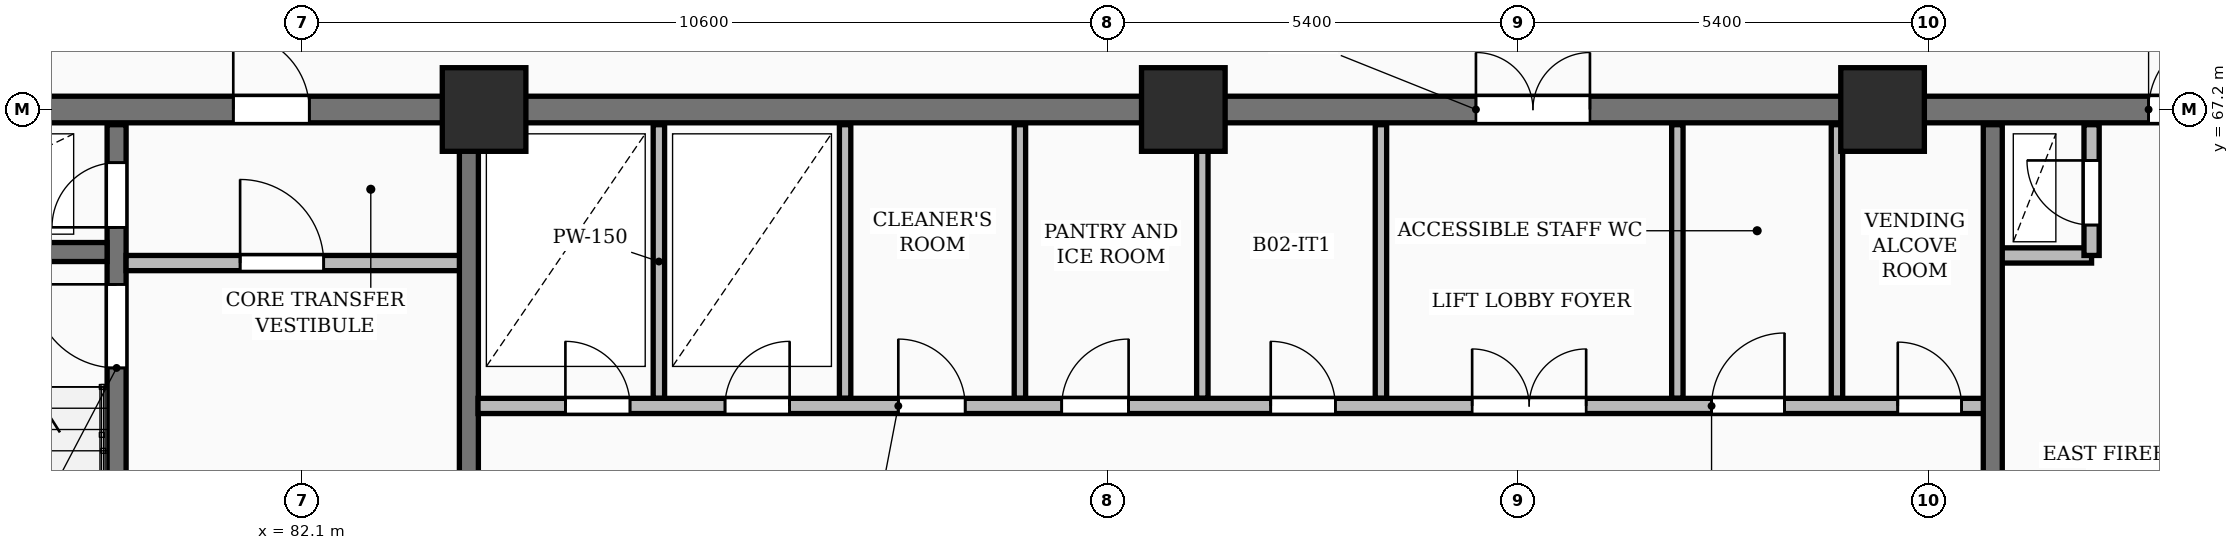
"""IFC4 building model, lengths in metres.
Left out: names, types, materials, properties, quantities, classifications, styles, units other than length and angle.
Written with IfcOpenShell. Run it as: python <this file> out.ifc"""

import sys

from ifc_helpers import new_model, si_unit, direction, frame, frame_2d, origin, origin_2d, place, context, subcontext, project, spatial, rectangle, extrude, element, fill, save


model = new_model("IFC4")
c1 = context("Model", 3, precision=1e-05, world=origin(), true_north=direction((0.0, 1.0)))
c2 = subcontext(c1, "Body", "Model", "MODEL_VIEW")
j1 = project(units=[si_unit("LENGTHUNIT", "METRE"), si_unit("PLANEANGLEUNIT", "RADIAN")], contexts=[c1])
p1 = place(None, origin())
s1 = spatial("IfcSite", under=j1, at=p1, CompositionType="ELEMENT")
p2 = place(p1, origin())
s2 = spatial("IfcBuilding", under=s1, at=p2, CompositionType="ELEMENT")
p3 = place(p2, frame((0.0, 0.0, -7.2)))
s3 = spatial("IfcBuildingStorey", under=s2, at=p3, CompositionType="ELEMENT", Elevation=-7.2)
for number, where, z_axis, x_axis in (
    (1, (84.5, 67.2, 0.0), (0.0, 0.0, 1.0), (1.0, 0.0, 0.0)),
    (2, (93.7, 67.2, 0.0), (0.0, 0.0, 1.0), (1.0, 0.0, 0.0)),
    (3, (102.9, 67.2, 0.0), (0.0, 0.0, 1.0), (1.0, 0.0, 0.0)),
):
    element("IfcColumn", number, at=place(p3, frame(where, z_axis=z_axis, x_axis=x_axis)), inside=s3, PredefinedType="COLUMN", context=c2, shape_type="SweptSolid", body=[
        extrude(rectangle(XDim=1.1, YDim=1.1, at=origin_2d()), origin(), (0.0, 0.0, 1.0), 3.6),
    ])
p4 = place(p3, frame((75.95, 67.2, 0.0), z_axis=(0.0, 0.0, 1.0), x_axis=(1.0, 0.0, 0.0)))
e4 = element("IfcWall", 4, at=p4, inside=s3, PredefinedType="SHEAR", context=c2, shape_type="SweptSolid", body=[
    extrude(rectangle(XDim=36.3, YDim=0.35, at=frame_2d((18.15, 0.0))), origin(), (0.0, 0.0, 1.0), 3.6),
])
p5 = place(p4, frame((5.25, 0.0, 0.0)))
e5 = element("IfcOpeningElement", 5, at=p5, cuts=e4, PredefinedType="OPENING", context=c2, shape_type="SweptSolid", body=[
    extrude(rectangle(XDim=1.0, YDim=2.15, at=frame_2d((0.5, 1.075))), frame((0.0, 0.185, 0.0), z_axis=(0.0, -1.0, 0.0), x_axis=(1.0, 0.0, 0.0)), (0.0, 0.0, 1.0), 0.37),
])
p6 = place(p4, frame((21.6, 0.0, 0.0)))
e6 = element("IfcOpeningElement", 6, at=p6, cuts=e4, PredefinedType="OPENING", context=c2, shape_type="SweptSolid", body=[
    extrude(rectangle(XDim=1.5, YDim=2.2, at=frame_2d((0.75, 1.1))), frame((0.0, 0.185, 0.0), z_axis=(0.0, -1.0, 0.0), x_axis=(1.0, 0.0, 0.0)), (0.0, 0.0, 1.0), 0.37),
])
p7 = place(p4, frame((30.45, 0.0, 0.0)))
e7 = element("IfcOpeningElement", 7, at=p7, cuts=e4, PredefinedType="OPENING", context=c2, shape_type="SweptSolid", body=[
    extrude(rectangle(XDim=1.0, YDim=2.15, at=frame_2d((0.5, 1.075))), frame((0.0, 0.185, 0.0), z_axis=(0.0, -1.0, 0.0), x_axis=(1.0, 0.0, 0.0)), (0.0, 0.0, 1.0), 0.37),
])
p8 = place(p3, frame((79.665, 55.4, 0.0), z_axis=(0.0, 0.0, 1.0), x_axis=(0.0, 1.0, 0.0)))
e8 = element("IfcWall", 8, at=p8, inside=s3, PredefinedType="SHEAR", context=c2, shape_type="SweptSolid", body=[
    extrude(rectangle(XDim=11.6, YDim=0.25, at=frame_2d((5.8, 0.0))), origin(), (0.0, 0.0, 1.0), 3.6),
])
p9 = place(p8, frame((0.55, 0.0, 0.0)))
e9 = element("IfcOpeningElement", 9, at=p9, cuts=e8, PredefinedType="OPENING", context=c2, shape_type="SweptSolid", body=[
    extrude(rectangle(XDim=0.85, YDim=2.05, at=frame_2d((0.425, 1.025))), frame((0.0, 0.135, 0.0), z_axis=(0.0, -1.0, 0.0), x_axis=(1.0, 0.0, 0.0)), (0.0, 0.0, 1.0), 0.27),
])
p10 = place(p8, frame((8.4, 0.0, 0.0)))
e10 = element("IfcOpeningElement", 10, at=p10, cuts=e8, PredefinedType="OPENING", context=c2, shape_type="SweptSolid", body=[
    extrude(rectangle(XDim=1.1, YDim=2.1, at=frame_2d((0.55, 1.05))), frame((0.0, 0.135, 0.0), z_axis=(0.0, -1.0, 0.0), x_axis=(1.0, 0.0, 0.0)), (0.0, 0.0, 1.0), 0.27),
])
p11 = place(p8, frame((10.25, 0.0, 0.0)))
e11 = element("IfcOpeningElement", 11, at=p11, cuts=e8, PredefinedType="OPENING", context=c2, shape_type="SweptSolid", body=[
    extrude(rectangle(XDim=0.85, YDim=2.05, at=frame_2d((0.425, 1.025))), frame((0.0, 0.135, 0.0), z_axis=(0.0, -1.0, 0.0), x_axis=(1.0, 0.0, 0.0)), (0.0, 0.0, 1.0), 0.27),
])
p12 = place(p3, frame((76.3, 65.325, 0.0), z_axis=(0.0, 0.0, 1.0), x_axis=(1.0, 0.0, 0.0)))
e12 = element("IfcWall", 12, at=p12, inside=s3, PredefinedType="SHEAR", context=c2, shape_type="SweptSolid", body=[
    extrude(rectangle(XDim=3.24, YDim=0.25, at=frame_2d((1.62, 0.0))), origin(), (0.0, 0.0, 1.0), 3.6),
])
p13 = place(p3, frame((79.79, 65.18, 0.0), z_axis=(0.0, 0.0, 1.0), x_axis=(1.0, 0.0, 0.0)))
e13 = element("IfcWall", 13, at=p13, inside=s3, PredefinedType="PARTITIONING", context=c2, shape_type="SweptSolid", body=[
    extrude(rectangle(XDim=4.39, YDim=0.2, at=frame_2d((2.195, 0.0))), origin(), (0.0, 0.0, 1.0), 3.3),
])
p14 = place(p13, frame((1.5, 0.0, 0.0)))
e14 = element("IfcOpeningElement", 14, at=p14, cuts=e13, PredefinedType="OPENING", context=c2, shape_type="SweptSolid", body=[
    extrude(rectangle(XDim=1.1, YDim=2.1, at=frame_2d((0.55, 1.05))), frame((0.0, 0.11, 0.0), z_axis=(0.0, -1.0, 0.0), x_axis=(1.0, 0.0, 0.0)), (0.0, 0.0, 1.0), 0.22),
])
p15 = place(p3, frame((84.3, 55.4, 0.0), z_axis=(0.0, 0.0, 1.0), x_axis=(0.0, 1.0, 0.0)))
e15 = element("IfcWall", 15, at=p15, inside=s3, PredefinedType="SHEAR", context=c2, shape_type="SweptSolid", body=[
    extrude(rectangle(XDim=11.6, YDim=0.25, at=frame_2d((5.8, 0.0))), origin(), (0.0, 0.0, 1.0), 3.6),
])
p16 = place(p15, frame((5.2, 0.0, 0.0)))
e16 = element("IfcOpeningElement", 16, at=p16, cuts=e15, PredefinedType="OPENING", context=c2, shape_type="SweptSolid", body=[
    extrude(rectangle(XDim=1.1, YDim=2.1, at=frame_2d((0.55, 1.05))), frame((0.0, 0.135, 0.0), z_axis=(0.0, -1.0, 0.0), x_axis=(1.0, 0.0, 0.0)), (0.0, 0.0, 1.0), 0.27),
])
for number, where, z_axis, x_axis in (
    (17, (86.8, 63.4, 0.0), (0.0, 0.0, 1.0), (0.0, 1.0, 0.0)),
    (18, (89.25, 63.4, 0.0), (0.0, 0.0, 1.0), (0.0, 1.0, 0.0)),
    (19, (91.55, 63.4, 0.0), (0.0, 0.0, 1.0), (0.0, 1.0, 0.0)),
):
    element("IfcWall", number, at=place(p3, frame(where, z_axis=z_axis, x_axis=x_axis)), inside=s3, PredefinedType="PARTITIONING", context=c2, shape_type="SweptSolid", body=[
        extrude(rectangle(XDim=3.6, YDim=0.15, at=frame_2d((1.8, 0.0))), origin(), (0.0, 0.0, 1.0), 3.3),
    ])
p17 = place(p3, frame((93.95, 63.4, 0.0), z_axis=(0.0, 0.0, 1.0), x_axis=(0.0, 1.0, 0.0)))
e20 = element("IfcWall", 20, at=p17, inside=s3, PredefinedType="PARTITIONING", context=c2, shape_type="SweptSolid", body=[
    extrude(rectangle(XDim=3.6, YDim=0.15, at=frame_2d((1.8, 0.0))), origin(), (0.0, 0.0, 1.0), 2.55),
])
for number, where, z_axis, x_axis in (
    (21, (102.3, 63.4, 0.0), (0.0, 0.0, 1.0), (0.0, 1.0, 0.0)),
    (22, (96.3, 63.4, 0.0), (0.0, 0.0, 1.0), (0.0, 1.0, 0.0)),
    (23, (100.2, 63.4, 0.0), (0.0, 0.0, 1.0), (0.0, 1.0, 0.0)),
):
    element("IfcWall", number, at=place(p3, frame(where, z_axis=z_axis, x_axis=x_axis)), inside=s3, PredefinedType="PARTITIONING", context=c2, shape_type="SweptSolid", body=[
        extrude(rectangle(XDim=3.6, YDim=0.15, at=frame_2d((1.8, 0.0))), origin(), (0.0, 0.0, 1.0), 3.3),
    ])
p18 = place(p3, frame((84.42, 63.3, 0.0), z_axis=(0.0, 0.0, 1.0), x_axis=(1.0, 0.0, 0.0)))
e24 = element("IfcWall", 24, at=p18, inside=s3, PredefinedType="PARTITIONING", context=c2, shape_type="SweptSolid", body=[
    extrude(rectangle(XDim=19.83, YDim=0.2, at=frame_2d((9.915, 0.0))), origin(), (0.0, 0.0, 1.0), 3.3),
])
p19 = place(p18, frame((1.15, 0.0, 0.0)))
e25 = element("IfcOpeningElement", 25, at=p19, cuts=e24, PredefinedType="OPENING", context=c2, shape_type="SweptSolid", body=[
    extrude(rectangle(XDim=0.85, YDim=2.05, at=frame_2d((0.425, 1.025))), frame((0.0, 0.11, 0.0), z_axis=(0.0, -1.0, 0.0), x_axis=(1.0, 0.0, 0.0)), (0.0, 0.0, 1.0), 0.22),
])
p20 = place(p18, frame((3.25, 0.0, 0.0)))
e26 = element("IfcOpeningElement", 26, at=p20, cuts=e24, PredefinedType="OPENING", context=c2, shape_type="SweptSolid", body=[
    extrude(rectangle(XDim=0.85, YDim=2.05, at=frame_2d((0.425, 1.025))), frame((0.0, 0.11, 0.0), z_axis=(0.0, -1.0, 0.0), x_axis=(1.0, 0.0, 0.0)), (0.0, 0.0, 1.0), 0.22),
])
p21 = place(p18, frame((13.08, 0.0, 0.0)))
e27 = element("IfcOpeningElement", 27, at=p21, cuts=e24, PredefinedType="OPENING", context=c2, shape_type="SweptSolid", body=[
    extrude(rectangle(XDim=1.5, YDim=2.2, at=frame_2d((0.75, 1.1))), frame((0.0, 0.11, 0.0), z_axis=(0.0, -1.0, 0.0), x_axis=(1.0, 0.0, 0.0)), (0.0, 0.0, 1.0), 0.22),
])
p22 = place(p18, frame((5.53, 0.0, 0.0)))
e28 = element("IfcOpeningElement", 28, at=p22, cuts=e24, PredefinedType="OPENING", context=c2, shape_type="SweptSolid", body=[
    extrude(rectangle(XDim=0.88, YDim=2.06, at=frame_2d((0.44, 1.03))), frame((0.0, 0.11, 0.0), z_axis=(0.0, -1.0, 0.0), x_axis=(1.0, 0.0, 0.0)), (0.0, 0.0, 1.0), 0.22),
])
p23 = place(p18, frame((7.68, 0.0, 0.0)))
e29 = element("IfcOpeningElement", 29, at=p23, cuts=e24, PredefinedType="OPENING", context=c2, shape_type="SweptSolid", body=[
    extrude(rectangle(XDim=0.88, YDim=2.06, at=frame_2d((0.44, 1.03))), frame((0.0, 0.11, 0.0), z_axis=(0.0, -1.0, 0.0), x_axis=(1.0, 0.0, 0.0)), (0.0, 0.0, 1.0), 0.22),
])
p24 = place(p18, frame((10.43, 0.0, 0.0)))
e30 = element("IfcOpeningElement", 30, at=p24, cuts=e24, PredefinedType="OPENING", context=c2, shape_type="SweptSolid", body=[
    extrude(rectangle(XDim=0.85, YDim=2.05, at=frame_2d((0.425, 1.025))), frame((0.0, 0.11, 0.0), z_axis=(0.0, -1.0, 0.0), x_axis=(1.0, 0.0, 0.0)), (0.0, 0.0, 1.0), 0.22),
])
p25 = place(p18, frame((16.23, 0.0, 0.0)))
e31 = element("IfcOpeningElement", 31, at=p25, cuts=e24, PredefinedType="OPENING", context=c2, shape_type="SweptSolid", body=[
    extrude(rectangle(XDim=0.96, YDim=2.1, at=frame_2d((0.48, 1.05))), frame((0.0, 0.11, 0.0), z_axis=(0.0, -1.0, 0.0), x_axis=(1.0, 0.0, 0.0)), (0.0, 0.0, 1.0), 0.22),
])
p26 = place(p18, frame((18.68, 0.0, 0.0)))
e32 = element("IfcOpeningElement", 32, at=p26, cuts=e24, PredefinedType="OPENING", context=c2, shape_type="SweptSolid", body=[
    extrude(rectangle(XDim=0.84, YDim=2.04, at=frame_2d((0.42, 1.02))), frame((0.0, 0.11, 0.0), z_axis=(0.0, -1.0, 0.0), x_axis=(1.0, 0.0, 0.0)), (0.0, 0.0, 1.0), 0.22),
])
p27 = place(p3, frame((104.45, 65.28, 0.0), z_axis=(0.0, 0.0, 1.0), x_axis=(1.0, 0.0, 0.0)))
e33 = element("IfcWall", 33, at=p27, inside=s3, PredefinedType="PARTITIONING", context=c2, shape_type="SweptSolid", body=[
    extrude(rectangle(XDim=1.2, YDim=0.2, at=frame_2d((0.6, 0.0))), origin(), (0.0, 0.0, 1.0), 3.3),
])
p28 = place(p3, frame((105.65, 65.28, 0.0), z_axis=(0.0, 0.0, 1.0), x_axis=(0.0, 1.0, 0.0)))
e34 = element("IfcWall", 34, at=p28, inside=s3, PredefinedType="PARTITIONING", context=c2, shape_type="SweptSolid", body=[
    extrude(rectangle(XDim=1.72, YDim=0.2, at=frame_2d((0.86, 0.0))), origin(), (0.0, 0.0, 1.0), 3.3),
])
p29 = place(p28, frame((0.4, 0.0, 0.0)))
e35 = element("IfcOpeningElement", 35, at=p29, cuts=e34, PredefinedType="OPENING", context=c2, shape_type="SweptSolid", body=[
    extrude(rectangle(XDim=0.85, YDim=2.05, at=frame_2d((0.425, 1.025))), frame((0.0, 0.11, 0.0), z_axis=(0.0, -1.0, 0.0), x_axis=(1.0, 0.0, 0.0)), (0.0, 0.0, 1.0), 0.22),
])
p30 = place(p3, frame((104.35, 58.4, 0.0), z_axis=(0.0, 0.0, 1.0), x_axis=(0.0, 1.0, 0.0)))
e36 = element("IfcWall", 36, at=p30, inside=s3, PredefinedType="SHEAR", context=c2, shape_type="SweptSolid", body=[
    extrude(rectangle(XDim=8.6, YDim=0.25, at=frame_2d((4.3, 0.0))), origin(), (0.0, 0.0, 1.0), 3.6),
])
p31 = place(p30, frame((1.8, 0.0, 0.0)))
e37 = element("IfcOpeningElement", 37, at=p31, cuts=e36, PredefinedType="OPENING", context=c2, shape_type="SweptSolid", body=[
    extrude(rectangle(XDim=1.1, YDim=2.1, at=frame_2d((0.55, 1.05))), frame((0.0, 0.135, 0.0), z_axis=(0.0, -1.0, 0.0), x_axis=(1.0, 0.0, 0.0)), (0.0, 0.0, 1.0), 0.27),
])
p32 = place(p5, origin())
e38 = element("IfcDoor", 38, at=p32, inside=s3, OperationType="SINGLE_SWING_LEFT", PredefinedType="DOOR", context=c2, shape_type="SweptSolid", body=[
    extrude(rectangle(XDim=1.0, YDim=2.15, at=frame_2d((0.5, 1.075))), frame((0.0, 0.025, 0.0), z_axis=(0.0, -1.0, 0.0), x_axis=(1.0, 0.0, 0.0)), (0.0, 0.0, 1.0), 0.05),
])
fill(e5, e38)
p33 = place(p6, origin())
e39 = element("IfcDoor", 39, at=p33, inside=s3, OperationType="DOUBLE_DOOR_SINGLE_SWING", PredefinedType="DOOR", context=c2, shape_type="SweptSolid", body=[
    extrude(rectangle(XDim=1.5, YDim=2.2, at=frame_2d((0.75, 1.1))), frame((0.0, 0.025, 0.0), z_axis=(0.0, -1.0, 0.0), x_axis=(1.0, 0.0, 0.0)), (0.0, 0.0, 1.0), 0.05),
])
fill(e6, e39)
p34 = place(p7, origin())
e40 = element("IfcDoor", 40, at=p34, inside=s3, OperationType="SINGLE_SWING_RIGHT", PredefinedType="DOOR", context=c2, shape_type="SweptSolid", body=[
    extrude(rectangle(XDim=1.0, YDim=2.15, at=frame_2d((0.5, 1.075))), frame((0.0, 0.025, 0.0), z_axis=(0.0, -1.0, 0.0), x_axis=(1.0, 0.0, 0.0)), (0.0, 0.0, 1.0), 0.05),
])
fill(e7, e40)
p35 = place(p10, origin())
e41 = element("IfcDoor", 41, at=p35, inside=s3, OperationType="SINGLE_SWING_RIGHT", PredefinedType="DOOR", context=c2, shape_type="SweptSolid", body=[
    extrude(rectangle(XDim=1.1, YDim=2.1, at=frame_2d((0.55, 1.05))), frame((0.0, 0.025, 0.0), z_axis=(0.0, -1.0, 0.0), x_axis=(1.0, 0.0, 0.0)), (0.0, 0.0, 1.0), 0.05),
])
fill(e10, e41)
p36 = place(p11, origin())
e42 = element("IfcDoor", 42, at=p36, inside=s3, OperationType="SINGLE_SWING_LEFT", PredefinedType="DOOR", context=c2, shape_type="SweptSolid", body=[
    extrude(rectangle(XDim=0.85, YDim=2.05, at=frame_2d((0.425, 1.025))), frame((0.0, 0.025, 0.0), z_axis=(0.0, -1.0, 0.0), x_axis=(1.0, 0.0, 0.0)), (0.0, 0.0, 1.0), 0.05),
])
fill(e11, e42)
p37 = place(p14, origin())
e43 = element("IfcDoor", 43, at=p37, inside=s3, OperationType="SINGLE_SWING_LEFT", PredefinedType="DOOR", context=c2, shape_type="SweptSolid", body=[
    extrude(rectangle(XDim=1.1, YDim=2.1, at=frame_2d((0.55, 1.05))), frame((0.0, 0.025, 0.0), z_axis=(0.0, -1.0, 0.0), x_axis=(1.0, 0.0, 0.0)), (0.0, 0.0, 1.0), 0.05),
])
fill(e14, e43)
p38 = place(p19, origin())
e44 = element("IfcDoor", 44, at=p38, inside=s3, OperationType="SINGLE_SWING_LEFT", PredefinedType="DOOR", context=c2, shape_type="SweptSolid", body=[
    extrude(rectangle(XDim=0.85, YDim=2.05, at=frame_2d((0.425, 1.025))), frame((0.0, 0.025, 0.0), z_axis=(0.0, -1.0, 0.0), x_axis=(1.0, 0.0, 0.0)), (0.0, 0.0, 1.0), 0.05),
])
fill(e25, e44)
p39 = place(p20, origin())
e45 = element("IfcDoor", 45, at=p39, inside=s3, OperationType="SINGLE_SWING_RIGHT", PredefinedType="DOOR", context=c2, shape_type="SweptSolid", body=[
    extrude(rectangle(XDim=0.85, YDim=2.05, at=frame_2d((0.425, 1.025))), frame((0.0, 0.025, 0.0), z_axis=(0.0, -1.0, 0.0), x_axis=(1.0, 0.0, 0.0)), (0.0, 0.0, 1.0), 0.05),
])
fill(e26, e45)
p40 = place(p21, origin())
e46 = element("IfcDoor", 46, at=p40, inside=s3, OperationType="DOUBLE_DOOR_SINGLE_SWING", PredefinedType="DOOR", context=c2, shape_type="SweptSolid", body=[
    extrude(rectangle(XDim=1.5, YDim=2.2, at=frame_2d((0.75, 1.1))), frame((0.0, 0.025, 0.0), z_axis=(0.0, -1.0, 0.0), x_axis=(1.0, 0.0, 0.0)), (0.0, 0.0, 1.0), 0.05),
])
fill(e27, e46)
p41 = place(p22, origin())
e47 = element("IfcDoor", 47, at=p41, inside=s3, OperationType="SINGLE_SWING_LEFT", PredefinedType="DOOR", context=c2, shape_type="SweptSolid", body=[
    extrude(rectangle(XDim=0.88, YDim=2.06, at=frame_2d((0.44, 1.03))), frame((0.0, 0.025, 0.0), z_axis=(0.0, -1.0, 0.0), x_axis=(1.0, 0.0, 0.0)), (0.0, 0.0, 1.0), 0.05),
])
fill(e28, e47)
p42 = place(p23, origin())
e48 = element("IfcDoor", 48, at=p42, inside=s3, OperationType="SINGLE_SWING_RIGHT", PredefinedType="DOOR", context=c2, shape_type="SweptSolid", body=[
    extrude(rectangle(XDim=0.88, YDim=2.06, at=frame_2d((0.44, 1.03))), frame((0.0, 0.025, 0.0), z_axis=(0.0, -1.0, 0.0), x_axis=(1.0, 0.0, 0.0)), (0.0, 0.0, 1.0), 0.05),
])
fill(e29, e48)
p43 = place(p24, origin())
e49 = element("IfcDoor", 49, at=p43, inside=s3, OperationType="SINGLE_SWING_LEFT", PredefinedType="DOOR", context=c2, shape_type="SweptSolid", body=[
    extrude(rectangle(XDim=0.85, YDim=2.05, at=frame_2d((0.425, 1.025))), frame((0.0, 0.025, 0.0), z_axis=(0.0, -1.0, 0.0), x_axis=(1.0, 0.0, 0.0)), (0.0, 0.0, 1.0), 0.05),
])
fill(e30, e49)
p44 = place(p25, origin())
e50 = element("IfcDoor", 50, at=p44, inside=s3, OperationType="SINGLE_SWING_RIGHT", PredefinedType="DOOR", context=c2, shape_type="SweptSolid", body=[
    extrude(rectangle(XDim=0.96, YDim=2.1, at=frame_2d((0.48, 1.05))), frame((0.0, 0.025, 0.0), z_axis=(0.0, -1.0, 0.0), x_axis=(1.0, 0.0, 0.0)), (0.0, 0.0, 1.0), 0.05),
])
fill(e31, e50)
p45 = place(p26, origin())
e51 = element("IfcDoor", 51, at=p45, inside=s3, OperationType="SINGLE_SWING_LEFT", PredefinedType="DOOR", context=c2, shape_type="SweptSolid", body=[
    extrude(rectangle(XDim=0.84, YDim=2.04, at=frame_2d((0.42, 1.02))), frame((0.0, 0.025, 0.0), z_axis=(0.0, -1.0, 0.0), x_axis=(1.0, 0.0, 0.0)), (0.0, 0.0, 1.0), 0.05),
])
fill(e32, e51)
p46 = place(p29, origin())
e52 = element("IfcDoor", 52, at=p46, inside=s3, OperationType="SINGLE_SWING_RIGHT", PredefinedType="DOOR", context=c2, shape_type="SweptSolid", body=[
    extrude(rectangle(XDim=0.85, YDim=2.05, at=frame_2d((0.425, 1.025))), frame((0.0, 0.025, 0.0), z_axis=(0.0, -1.0, 0.0), x_axis=(1.0, 0.0, 0.0)), (0.0, 0.0, 1.0), 0.05),
])
fill(e35, e52)
save(model, sys.argv[1])
